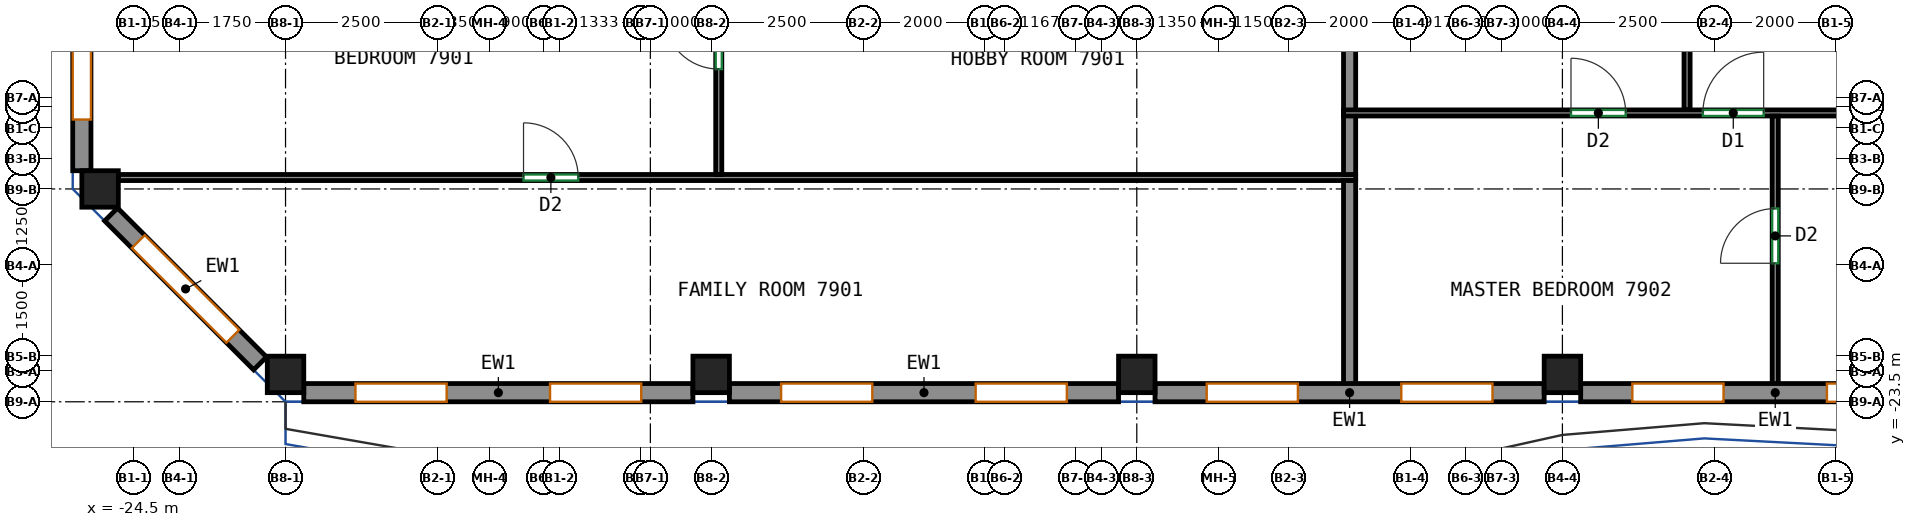
"""IFC4 building model, lengths in metres.
Left out: names, types, materials, properties, quantities, classifications, styles, units other than length and angle.
Written with IfcOpenShell. Run it as: python <this file> out.ifc"""

import sys

from ifc_helpers import new_model, si_unit, direction, frame, frame_2d, origin, origin_2d, place, context, subcontext, project, spatial, rectangle, extrude, source, transform, mapped, element, fill, save


model = new_model("IFC4")
c1 = context("Model", 3, precision=1e-05, world=origin(), true_north=direction((0.0, 1.0)))
c2 = subcontext(c1, "Body", "Model", "MODEL_VIEW")
j1 = project(units=[si_unit("LENGTHUNIT", "METRE"), si_unit("PLANEANGLEUNIT", "RADIAN")], contexts=[c1])
p1 = place(None, origin())
s1 = spatial("IfcSite", under=j1, at=p1, CompositionType="ELEMENT")
p2 = place(p1, origin())
s2 = spatial("IfcBuilding", under=s1, at=p2, CompositionType="ELEMENT")
p3 = place(p2, frame((0.0, 0.0, 315.4)))
s3 = spatial("IfcBuildingStorey", under=s2, at=p3, CompositionType="ELEMENT", Elevation=315.4)
m1 = source(origin(), c2, "Body", "SweptSolid", [
    extrude(rectangle(XDim=0.6, YDim=0.6, at=origin_2d()), origin(), (0.0, 0.0, 1.0), 3.0),
])
for number, where, z_axis, x_axis in (
    (1, (-25.05, -20.0, 0.0), (0.0, 0.0, 1.0), (1.0, 0.0, 0.0)),
    (2, (-22.0, -23.05, 0.0), (0.0, 0.0, 1.0), (1.0, 0.0, 0.0)),
    (3, (-15.0, -23.05, 0.0), (0.0, 0.0, 1.0), (1.0, 0.0, 0.0)),
    (4, (-8.0, -23.05, 0.0), (0.0, 0.0, 1.0), (1.0, 0.0, 0.0)),
    (5, (-1.0, -23.05, 0.0), (0.0, 0.0, 1.0), (1.0, 0.0, 0.0)),
):
    element("IfcColumn", number, at=place(p3, frame(where, z_axis=z_axis, x_axis=x_axis)), inside=s3, PredefinedType="COLUMN", context=c2, shape_type="MappedRepresentation", body=[
        mapped(m1, transform((0.0, 0.0, 0.0))),
    ])
m2 = source(origin(), c2, "Body", "SweptSolid", [
    extrude(rectangle(XDim=6.4, YDim=0.3, at=frame_2d((3.2, 0.0))), origin(), (0.0, 0.0, 1.0), 3.0),
])
p4 = place(p3, frame((-21.7, -23.35, 0.0), z_axis=(0.0, 0.0, 1.0), x_axis=(1.0, 0.0, 0.0)))
e6 = element("IfcWall", 6, at=p4, inside=s3, PredefinedType="SOLIDWALL", context=c2, shape_type="MappedRepresentation", body=[
    mapped(m2, transform((0.0, 0.0, 0.0))),
])
p5 = place(p4, frame((0.85, 0.0, 0.8)))
e7 = element("IfcOpeningElement", 7, at=p5, cuts=e6, PredefinedType="OPENING", context=c2, shape_type="SweptSolid", body=[
    extrude(rectangle(XDim=1.5, YDim=2.05, at=frame_2d((0.75, 1.025))), frame((0.0, 0.16, 0.0), z_axis=(0.0, -1.0, 0.0), x_axis=(1.0, 0.0, 0.0)), (0.0, 0.0, 1.0), 0.32),
])
p6 = place(p4, frame((4.05, 0.0, 0.8)))
e8 = element("IfcOpeningElement", 8, at=p6, cuts=e6, PredefinedType="OPENING", context=c2, shape_type="SweptSolid", body=[
    extrude(rectangle(XDim=1.5, YDim=2.05, at=frame_2d((0.75, 1.025))), frame((0.0, 0.16, 0.0), z_axis=(0.0, -1.0, 0.0), x_axis=(1.0, 0.0, 0.0)), (0.0, 0.0, 1.0), 0.32),
])
p7 = place(p3, frame((-14.7, -23.35, 0.0), z_axis=(0.0, 0.0, 1.0), x_axis=(1.0, 0.0, 0.0)))
e9 = element("IfcWall", 9, at=p7, inside=s3, PredefinedType="SOLIDWALL", context=c2, shape_type="MappedRepresentation", body=[
    mapped(m2, transform((0.0, 0.0, 0.0))),
])
p8 = place(p7, frame((0.85, 0.0, 0.8)))
e10 = element("IfcOpeningElement", 10, at=p8, cuts=e9, PredefinedType="OPENING", context=c2, shape_type="SweptSolid", body=[
    extrude(rectangle(XDim=1.5, YDim=2.05, at=frame_2d((0.75, 1.025))), frame((0.0, 0.16, 0.0), z_axis=(0.0, -1.0, 0.0), x_axis=(1.0, 0.0, 0.0)), (0.0, 0.0, 1.0), 0.32),
])
p9 = place(p7, frame((4.05, 0.0, 0.8)))
e11 = element("IfcOpeningElement", 11, at=p9, cuts=e9, PredefinedType="OPENING", context=c2, shape_type="SweptSolid", body=[
    extrude(rectangle(XDim=1.5, YDim=2.05, at=frame_2d((0.75, 1.025))), frame((0.0, 0.16, 0.0), z_axis=(0.0, -1.0, 0.0), x_axis=(1.0, 0.0, 0.0)), (0.0, 0.0, 1.0), 0.32),
])
p10 = place(p3, frame((-7.7, -23.35, 0.0), z_axis=(0.0, 0.0, 1.0), x_axis=(1.0, 0.0, 0.0)))
e12 = element("IfcWall", 12, at=p10, inside=s3, PredefinedType="SOLIDWALL", context=c2, shape_type="MappedRepresentation", body=[
    mapped(m2, transform((0.0, 0.0, 0.0))),
])
p11 = place(p10, frame((0.85, 0.0, 0.8)))
e13 = element("IfcOpeningElement", 13, at=p11, cuts=e12, PredefinedType="OPENING", context=c2, shape_type="SweptSolid", body=[
    extrude(rectangle(XDim=1.5, YDim=2.05, at=frame_2d((0.75, 1.025))), frame((0.0, 0.16, 0.0), z_axis=(0.0, -1.0, 0.0), x_axis=(1.0, 0.0, 0.0)), (0.0, 0.0, 1.0), 0.32),
])
p12 = place(p10, frame((4.05, 0.0, 0.8)))
e14 = element("IfcOpeningElement", 14, at=p12, cuts=e12, PredefinedType="OPENING", context=c2, shape_type="SweptSolid", body=[
    extrude(rectangle(XDim=1.5, YDim=2.05, at=frame_2d((0.75, 1.025))), frame((0.0, 0.16, 0.0), z_axis=(0.0, -1.0, 0.0), x_axis=(1.0, 0.0, 0.0)), (0.0, 0.0, 1.0), 0.32),
])
p13 = place(p3, frame((-0.7, -23.35, 0.0), z_axis=(0.0, 0.0, 1.0), x_axis=(1.0, 0.0, 0.0)))
e15 = element("IfcWall", 15, at=p13, inside=s3, PredefinedType="SOLIDWALL", context=c2, shape_type="MappedRepresentation", body=[
    mapped(m2, transform((0.0, 0.0, 0.0))),
])
p14 = place(p13, frame((0.85, 0.0, 0.8)))
e16 = element("IfcOpeningElement", 16, at=p14, cuts=e15, PredefinedType="OPENING", context=c2, shape_type="SweptSolid", body=[
    extrude(rectangle(XDim=1.5, YDim=2.05, at=frame_2d((0.75, 1.025))), frame((0.0, 0.16, 0.0), z_axis=(0.0, -1.0, 0.0), x_axis=(1.0, 0.0, 0.0)), (0.0, 0.0, 1.0), 0.32),
])
p15 = place(p13, frame((4.05, 0.0, 0.8)))
e17 = element("IfcOpeningElement", 17, at=p15, cuts=e15, PredefinedType="OPENING", context=c2, shape_type="SweptSolid", body=[
    extrude(rectangle(XDim=1.5, YDim=2.05, at=frame_2d((0.75, 1.025))), frame((0.0, 0.16, 0.0), z_axis=(0.0, -1.0, 0.0), x_axis=(1.0, 0.0, 0.0)), (0.0, 0.0, 1.0), 0.32),
])
m3 = source(origin(), c2, "Body", "SweptSolid", [
    extrude(rectangle(XDim=11.65, YDim=0.3, at=frame_2d((5.825, 0.0))), origin(), (0.0, 0.0, 1.0), 3.0),
])
p16 = place(p3, frame((-25.35, -8.05, 0.0), z_axis=(0.0, 0.0, 1.0), x_axis=(0.0, -1.0, 0.0)))
e18 = element("IfcWall", 18, at=p16, inside=s3, PredefinedType="SOLIDWALL", context=c2, shape_type="MappedRepresentation", body=[
    mapped(m3, transform((0.0, 0.0, 0.0))),
])
p17 = place(p16, frame((0.842, 0.0, 0.8)))
e19 = element("IfcOpeningElement", 19, at=p17, cuts=e18, PredefinedType="OPENING", context=c2, shape_type="SweptSolid", body=[
    extrude(rectangle(XDim=2.2, YDim=2.05, at=frame_2d((1.1, 1.025))), frame((0.0, 0.16, 0.0), z_axis=(0.0, -1.0, 0.0), x_axis=(1.0, 0.0, 0.0)), (0.0, 0.0, 1.0), 0.32),
])
p18 = place(p16, frame((4.725, 0.0, 0.8)))
e20 = element("IfcOpeningElement", 20, at=p18, cuts=e18, PredefinedType="OPENING", context=c2, shape_type="SweptSolid", body=[
    extrude(rectangle(XDim=2.2, YDim=2.05, at=frame_2d((1.1, 1.025))), frame((0.0, 0.16, 0.0), z_axis=(0.0, -1.0, 0.0), x_axis=(1.0, 0.0, 0.0)), (0.0, 0.0, 1.0), 0.32),
])
p19 = place(p16, frame((8.608, 0.0, 0.8)))
e21 = element("IfcOpeningElement", 21, at=p19, cuts=e18, PredefinedType="OPENING", context=c2, shape_type="SweptSolid", body=[
    extrude(rectangle(XDim=2.2, YDim=2.05, at=frame_2d((1.1, 1.025))), frame((0.0, 0.16, 0.0), z_axis=(0.0, -1.0, 0.0), x_axis=(1.0, 0.0, 0.0)), (0.0, 0.0, 1.0), 0.32),
])
m4 = source(origin(), c2, "Body", "SweptSolid", [
    extrude(rectangle(XDim=3.465, YDim=0.3, at=frame_2d((1.732, 0.0))), origin(), (0.0, 0.0, 1.0), 3.0),
])
p20 = place(p3, frame((-24.869, -20.419, 0.0), z_axis=(0.0, 0.0, 1.0), x_axis=(0.707106781187, -0.707106781187, 0.0)))
e22 = element("IfcWall", 22, at=p20, inside=s3, PredefinedType="SOLIDWALL", context=c2, shape_type="MappedRepresentation", body=[
    mapped(m4, transform((0.0, 0.0, 0.0))),
])
p21 = place(p20, frame((0.632, 0.0, 0.8)))
e23 = element("IfcOpeningElement", 23, at=p21, cuts=e22, PredefinedType="OPENING", context=c2, shape_type="SweptSolid", body=[
    extrude(rectangle(XDim=2.2, YDim=2.05, at=frame_2d((1.1, 1.025))), frame((0.0, 0.16, 0.0), z_axis=(0.0, -1.0, 0.0), x_axis=(1.0, 0.0, 0.0)), (0.0, 0.0, 1.0), 0.32),
])
p22 = place(p3, frame((-24.75, -19.812, 0.0), z_axis=(0.0, 0.0, 1.0), x_axis=(1.0, 0.0, 0.0)))
e24 = element("IfcWall", 24, at=p22, inside=s3, PredefinedType="PARTITIONING", context=c2, shape_type="SweptSolid", body=[
    extrude(rectangle(XDim=20.35, YDim=0.1, at=frame_2d((10.175, 0.0))), origin(), (0.0, 0.0, 1.0), 3.0),
])
p23 = place(p22, frame((6.664, 0.0, 0.0)))
e25 = element("IfcOpeningElement", 25, at=p23, cuts=e24, PredefinedType="OPENING", context=c2, shape_type="SweptSolid", body=[
    extrude(rectangle(XDim=0.9, YDim=2.1, at=frame_2d((0.45, 1.05))), frame((0.0, 0.06, 0.0), z_axis=(0.0, -1.0, 0.0), x_axis=(1.0, 0.0, 0.0)), (0.0, 0.0, 1.0), 0.12),
])
p24 = place(p3, frame((-4.5, -23.25, 0.0), z_axis=(0.0, 0.0, 1.0), x_axis=(0.0, 1.0, 0.0)))
e26 = element("IfcWall", 26, at=p24, inside=s3, PredefinedType="PARTITIONING", context=c2, shape_type="SweptSolid", body=[
    extrude(rectangle(XDim=3.388, YDim=0.2, at=frame_2d((1.694, 0.0))), origin(), (0.0, 0.0, 1.0), 3.0),
])
p25 = place(p3, frame((-14.875, -19.762, 0.0), z_axis=(0.0, 0.0, 1.0), x_axis=(0.0, 1.0, 0.0)))
e27 = element("IfcWall", 27, at=p25, inside=s3, PredefinedType="PARTITIONING", context=c2, shape_type="SweptSolid", body=[
    extrude(rectangle(XDim=3.65, YDim=0.1, at=frame_2d((1.825, 0.0))), origin(), (0.0, 0.0, 1.0), 3.0),
])
p26 = place(p25, frame((1.733, 0.0, 0.0)))
e28 = element("IfcOpeningElement", 28, at=p26, cuts=e27, PredefinedType="OPENING", context=c2, shape_type="SweptSolid", body=[
    extrude(rectangle(XDim=0.9, YDim=2.1, at=frame_2d((0.45, 1.05))), frame((0.0, 0.06, 0.0), z_axis=(0.0, -1.0, 0.0), x_axis=(1.0, 0.0, 0.0)), (0.0, 0.0, 1.0), 0.12),
])
p27 = place(p3, frame((-4.5, -18.71, 0.0), z_axis=(0.0, 0.0, 1.0), x_axis=(0.0, 1.0, 0.0)))
e29 = element("IfcWall", 29, at=p27, inside=s3, PredefinedType="PARTITIONING", context=c2, shape_type="SweptSolid", body=[
    extrude(rectangle(XDim=2.598, YDim=0.2, at=frame_2d((1.299, 0.0))), origin(), (0.0, 0.0, 1.0), 3.0),
])
p28 = place(p3, frame((-4.5, -19.762, 0.0), z_axis=(0.0, 0.0, 1.0), x_axis=(0.0, 1.0, 0.0)))
e30 = element("IfcWall", 30, at=p28, inside=s3, PredefinedType="PARTITIONING", context=c2, shape_type="SweptSolid", body=[
    extrude(rectangle(XDim=0.97, YDim=0.2, at=frame_2d((0.485, 0.0))), origin(), (0.0, 0.0, 1.0), 3.0),
])
p29 = place(p3, frame((1.05, -18.7, 0.0), z_axis=(0.0, 0.0, 1.0), x_axis=(0.0, 1.0, 0.0)))
e31 = element("IfcWall", 31, at=p29, inside=s3, PredefinedType="PARTITIONING", context=c2, shape_type="SweptSolid", body=[
    extrude(rectangle(XDim=4.048, YDim=0.1, at=frame_2d((2.024, 0.0))), origin(), (0.0, 0.0, 1.0), 3.0),
])
p30 = place(p3, frame((-4.6, -18.75, 0.0), z_axis=(0.0, 0.0, 1.0), x_axis=(1.0, 0.0, 0.0)))
e32 = element("IfcWall", 32, at=p30, inside=s3, PredefinedType="PARTITIONING", context=c2, shape_type="SweptSolid", body=[
    extrude(rectangle(XDim=27.85, YDim=0.1, at=frame_2d((13.925, 0.0))), origin(), (0.0, 0.0, 1.0), 3.0),
])
p31 = place(p30, frame((3.741, 0.0, 0.0)))
e33 = element("IfcOpeningElement", 33, at=p31, cuts=e32, PredefinedType="OPENING", context=c2, shape_type="SweptSolid", body=[
    extrude(rectangle(XDim=0.9, YDim=2.1, at=frame_2d((0.45, 1.05))), frame((0.0, 0.06, 0.0), z_axis=(0.0, -1.0, 0.0), x_axis=(1.0, 0.0, 0.0)), (0.0, 0.0, 1.0), 0.12),
])
p32 = place(p30, frame((5.91, 0.0, 0.0)))
e34 = element("IfcOpeningElement", 34, at=p32, cuts=e32, PredefinedType="OPENING", context=c2, shape_type="SweptSolid", body=[
    extrude(rectangle(XDim=1.0, YDim=2.1, at=frame_2d((0.5, 1.05))), frame((0.0, 0.06, 0.0), z_axis=(0.0, -1.0, 0.0), x_axis=(1.0, 0.0, 0.0)), (0.0, 0.0, 1.0), 0.12),
])
p33 = place(p3, frame((2.5, -23.25, 0.0), z_axis=(0.0, 0.0, 1.0), x_axis=(0.0, 1.0, 0.0)))
e35 = element("IfcWall", 35, at=p33, inside=s3, PredefinedType="PARTITIONING", context=c2, shape_type="SweptSolid", body=[
    extrude(rectangle(XDim=4.448, YDim=0.1, at=frame_2d((2.224, 0.0))), origin(), (0.0, 0.0, 1.0), 3.0),
])
p34 = place(p33, frame((2.028, 0.0, 0.0)))
e36 = element("IfcOpeningElement", 36, at=p34, cuts=e35, PredefinedType="OPENING", context=c2, shape_type="SweptSolid", body=[
    extrude(rectangle(XDim=0.9, YDim=2.1, at=frame_2d((0.45, 1.05))), frame((0.0, 0.06, 0.0), z_axis=(0.0, -1.0, 0.0), x_axis=(1.0, 0.0, 0.0)), (0.0, 0.0, 1.0), 0.12),
])
p35 = place(p5, origin())
e37 = element("IfcWindow", 37, at=p35, inside=s3, PartitioningType="SINGLE_PANEL", PredefinedType="WINDOW", context=c2, shape_type="SweptSolid", body=[
    extrude(rectangle(XDim=1.5, YDim=2.05, at=frame_2d((0.75, 1.025))), frame((0.0, 0.03, 0.0), z_axis=(0.0, -1.0, 0.0), x_axis=(1.0, 0.0, 0.0)), (0.0, 0.0, 1.0), 0.06),
])
fill(e7, e37)
p36 = place(p6, origin())
e38 = element("IfcWindow", 38, at=p36, inside=s3, PartitioningType="SINGLE_PANEL", PredefinedType="WINDOW", context=c2, shape_type="SweptSolid", body=[
    extrude(rectangle(XDim=1.5, YDim=2.05, at=frame_2d((0.75, 1.025))), frame((0.0, 0.03, 0.0), z_axis=(0.0, -1.0, 0.0), x_axis=(1.0, 0.0, 0.0)), (0.0, 0.0, 1.0), 0.06),
])
fill(e8, e38)
p37 = place(p8, origin())
e39 = element("IfcWindow", 39, at=p37, inside=s3, PartitioningType="SINGLE_PANEL", PredefinedType="WINDOW", context=c2, shape_type="SweptSolid", body=[
    extrude(rectangle(XDim=1.5, YDim=2.05, at=frame_2d((0.75, 1.025))), frame((0.0, 0.03, 0.0), z_axis=(0.0, -1.0, 0.0), x_axis=(1.0, 0.0, 0.0)), (0.0, 0.0, 1.0), 0.06),
])
fill(e10, e39)
p38 = place(p9, origin())
e40 = element("IfcWindow", 40, at=p38, inside=s3, PartitioningType="SINGLE_PANEL", PredefinedType="WINDOW", context=c2, shape_type="SweptSolid", body=[
    extrude(rectangle(XDim=1.5, YDim=2.05, at=frame_2d((0.75, 1.025))), frame((0.0, 0.03, 0.0), z_axis=(0.0, -1.0, 0.0), x_axis=(1.0, 0.0, 0.0)), (0.0, 0.0, 1.0), 0.06),
])
fill(e11, e40)
p39 = place(p11, origin())
e41 = element("IfcWindow", 41, at=p39, inside=s3, PartitioningType="SINGLE_PANEL", PredefinedType="WINDOW", context=c2, shape_type="SweptSolid", body=[
    extrude(rectangle(XDim=1.5, YDim=2.05, at=frame_2d((0.75, 1.025))), frame((0.0, 0.03, 0.0), z_axis=(0.0, -1.0, 0.0), x_axis=(1.0, 0.0, 0.0)), (0.0, 0.0, 1.0), 0.06),
])
fill(e13, e41)
p40 = place(p12, origin())
e42 = element("IfcWindow", 42, at=p40, inside=s3, PartitioningType="SINGLE_PANEL", PredefinedType="WINDOW", context=c2, shape_type="SweptSolid", body=[
    extrude(rectangle(XDim=1.5, YDim=2.05, at=frame_2d((0.75, 1.025))), frame((0.0, 0.03, 0.0), z_axis=(0.0, -1.0, 0.0), x_axis=(1.0, 0.0, 0.0)), (0.0, 0.0, 1.0), 0.06),
])
fill(e14, e42)
p41 = place(p14, origin())
e43 = element("IfcWindow", 43, at=p41, inside=s3, PartitioningType="SINGLE_PANEL", PredefinedType="WINDOW", context=c2, shape_type="SweptSolid", body=[
    extrude(rectangle(XDim=1.5, YDim=2.05, at=frame_2d((0.75, 1.025))), frame((0.0, 0.03, 0.0), z_axis=(0.0, -1.0, 0.0), x_axis=(1.0, 0.0, 0.0)), (0.0, 0.0, 1.0), 0.06),
])
fill(e16, e43)
p42 = place(p15, origin())
e44 = element("IfcWindow", 44, at=p42, inside=s3, PartitioningType="SINGLE_PANEL", PredefinedType="WINDOW", context=c2, shape_type="SweptSolid", body=[
    extrude(rectangle(XDim=1.5, YDim=2.05, at=frame_2d((0.75, 1.025))), frame((0.0, 0.03, 0.0), z_axis=(0.0, -1.0, 0.0), x_axis=(1.0, 0.0, 0.0)), (0.0, 0.0, 1.0), 0.06),
])
fill(e17, e44)
p43 = place(p19, origin())
e45 = element("IfcWindow", 45, at=p43, inside=s3, PartitioningType="SINGLE_PANEL", PredefinedType="WINDOW", context=c2, shape_type="SweptSolid", body=[
    extrude(rectangle(XDim=2.2, YDim=2.05, at=frame_2d((1.1, 1.025))), frame((0.0, 0.03, 0.0), z_axis=(0.0, -1.0, 0.0), x_axis=(1.0, 0.0, 0.0)), (0.0, 0.0, 1.0), 0.06),
])
fill(e21, e45)
p44 = place(p21, origin())
e46 = element("IfcWindow", 46, at=p44, inside=s3, PartitioningType="SINGLE_PANEL", PredefinedType="WINDOW", context=c2, shape_type="SweptSolid", body=[
    extrude(rectangle(XDim=2.2, YDim=2.05, at=frame_2d((1.1, 1.025))), frame((0.0, 0.03, 0.0), z_axis=(0.0, -1.0, 0.0), x_axis=(1.0, 0.0, 0.0)), (0.0, 0.0, 1.0), 0.06),
])
fill(e23, e46)
p45 = place(p34, origin())
e47 = element("IfcDoor", 47, at=p45, inside=s3, OperationType="SINGLE_SWING_LEFT", PredefinedType="DOOR", context=c2, shape_type="SweptSolid", body=[
    extrude(rectangle(XDim=0.9, YDim=2.1, at=frame_2d((0.45, 1.05))), frame((0.0, 0.025, 0.0), z_axis=(0.0, -1.0, 0.0), x_axis=(1.0, 0.0, 0.0)), (0.0, 0.0, 1.0), 0.05),
])
fill(e36, e47)
p46 = place(p23, origin())
e48 = element("IfcDoor", 48, at=p46, inside=s3, OperationType="SINGLE_SWING_LEFT", PredefinedType="DOOR", context=c2, shape_type="SweptSolid", body=[
    extrude(rectangle(XDim=0.9, YDim=2.1, at=frame_2d((0.45, 1.05))), frame((0.0, 0.025, 0.0), z_axis=(0.0, -1.0, 0.0), x_axis=(1.0, 0.0, 0.0)), (0.0, 0.0, 1.0), 0.05),
])
fill(e25, e48)
p47 = place(p31, origin())
e49 = element("IfcDoor", 49, at=p47, inside=s3, OperationType="SINGLE_SWING_LEFT", PredefinedType="DOOR", context=c2, shape_type="SweptSolid", body=[
    extrude(rectangle(XDim=0.9, YDim=2.1, at=frame_2d((0.45, 1.05))), frame((0.0, 0.025, 0.0), z_axis=(0.0, -1.0, 0.0), x_axis=(1.0, 0.0, 0.0)), (0.0, 0.0, 1.0), 0.05),
])
fill(e33, e49)
p48 = place(p32, origin())
e50 = element("IfcDoor", 50, at=p48, inside=s3, OperationType="SINGLE_SWING_RIGHT", PredefinedType="DOOR", context=c2, shape_type="SweptSolid", body=[
    extrude(rectangle(XDim=1.0, YDim=2.1, at=frame_2d((0.5, 1.05))), frame((0.0, 0.025, 0.0), z_axis=(0.0, -1.0, 0.0), x_axis=(1.0, 0.0, 0.0)), (0.0, 0.0, 1.0), 0.05),
])
fill(e34, e50)
p49 = place(p26, origin())
e51 = element("IfcDoor", 51, at=p49, inside=s3, OperationType="SINGLE_SWING_RIGHT", PredefinedType="DOOR", context=c2, shape_type="SweptSolid", body=[
    extrude(rectangle(XDim=0.9, YDim=2.1, at=frame_2d((0.45, 1.05))), frame((0.0, 0.025, 0.0), z_axis=(0.0, -1.0, 0.0), x_axis=(1.0, 0.0, 0.0)), (0.0, 0.0, 1.0), 0.05),
])
fill(e28, e51)
save(model, sys.argv[1])
